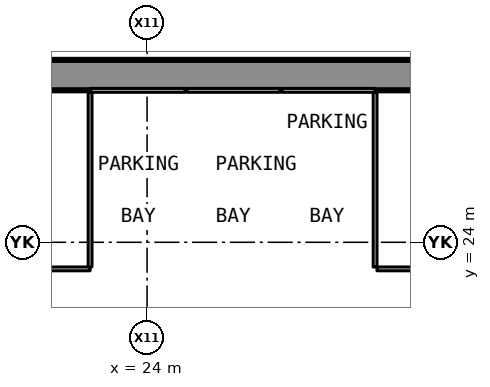
"""IFC4 building model, lengths in metres.
Left out: names, types, materials, properties, quantities, classifications, styles, units other than length and angle.
Written with IfcOpenShell. Run it as: python <this file> out.ifc"""

import sys

from ifc_helpers import new_model, si_unit, direction, frame, frame_2d, origin, place, context, subcontext, project, spatial, rectangle, extrude, element, save


model = new_model("IFC4")
c1 = context("Model", 3, precision=1e-05, world=origin(), true_north=direction((0.0, 1.0)))
c2 = subcontext(c1, "Body", "Model", "MODEL_VIEW")
j1 = project(units=[si_unit("LENGTHUNIT", "METRE"), si_unit("PLANEANGLEUNIT", "RADIAN")], contexts=[c1])
p1 = place(None, origin())
s1 = spatial("IfcSite", under=j1, at=p1, CompositionType="ELEMENT")
p2 = place(p1, origin())
s2 = spatial("IfcBuilding", under=s1, at=p2, CompositionType="ELEMENT")
p3 = place(p2, frame((0.0, 0.0, -10.0)))
s3 = spatial("IfcBuildingStorey", under=s2, at=p3, CompositionType="ELEMENT", Elevation=-10.0)
p4 = place(p3, frame((-37.6, 28.4, -0.6), z_axis=(0.0, 0.0, 1.0), x_axis=(1.0, 0.0, 0.0)))
e1 = element("IfcWall", 1, at=p4, inside=s3, PredefinedType="SOLIDWALL", context=c2, shape_type="SweptSolid", body=[
    extrude(rectangle(XDim=75.2, YDim=0.8, at=frame_2d((37.6, 0.0))), origin(), (0.0, 0.0, 1.0), 5.3),
])
p5 = place(p3, frame((12.5, 23.3, 0.0), z_axis=(0.0, 0.0, 1.0), x_axis=(1.0, 0.0, 0.0)))
e2 = element("IfcWall", 2, at=p5, inside=s3, PredefinedType="PARTITIONING", context=c2, shape_type="SweptSolid", body=[
    extrude(rectangle(XDim=10.0, YDim=0.1, at=frame_2d((5.0, 0.0))), origin(), (0.0, 0.0, 1.0), 4.7),
])
p6 = place(p3, frame((30.05, 23.3, 0.0), z_axis=(0.0, 0.0, 1.0), x_axis=(1.0, 0.0, 0.0)))
e3 = element("IfcWall", 3, at=p6, inside=s3, PredefinedType="PARTITIONING", context=c2, shape_type="SweptSolid", body=[
    extrude(rectangle(XDim=7.55, YDim=0.1, at=frame_2d((3.775, 0.0))), origin(), (0.0, 0.0, 1.0), 4.7),
])
p7 = place(p3, frame((22.5, 28.0, 0.0), z_axis=(0.0, 0.0, 1.0), x_axis=(1.0, 0.0, 0.0)))
e4 = element("IfcWall", 4, at=p7, inside=s3, PredefinedType="PARTITIONING", context=c2, shape_type="SweptSolid", body=[
    extrude(rectangle(XDim=2.5, YDim=0.1, at=frame_2d((1.25, 0.0))), origin(), (0.0, 0.0, 1.0), 4.078),
])
for number, where, z_axis, x_axis in (
    (5, (25.05, 28.0, 0.0), (0.0, 0.0, 1.0), (1.0, 0.0, 0.0)),
    (6, (27.55, 28.0, 0.0), (0.0, 0.0, 1.0), (1.0, 0.0, 0.0)),
):
    element("IfcWall", number, at=place(p3, frame(where, z_axis=z_axis, x_axis=x_axis)), inside=s3, PredefinedType="PARTITIONING", context=c2, shape_type="SweptSolid", body=[
        extrude(rectangle(XDim=2.45, YDim=0.1, at=frame_2d((1.225, 0.0))), origin(), (0.0, 0.0, 1.0), 4.078),
    ])
for number, where, z_axis, x_axis in (
    (7, (22.5, 23.35, 0.0), (0.0, 0.0, 1.0), (0.0, 1.0, 0.0)),
    (8, (30.0, 23.35, 0.0), (0.0, 0.0, 1.0), (0.0, 1.0, 0.0)),
):
    element("IfcWall", number, at=place(p3, frame(where, z_axis=z_axis, x_axis=x_axis)), inside=s3, PredefinedType="PARTITIONING", context=c2, shape_type="SweptSolid", body=[
        extrude(rectangle(XDim=4.6, YDim=0.1, at=frame_2d((2.3, 0.0))), origin(), (0.0, 0.0, 1.0), 4.7),
    ])
save(model, sys.argv[1])
